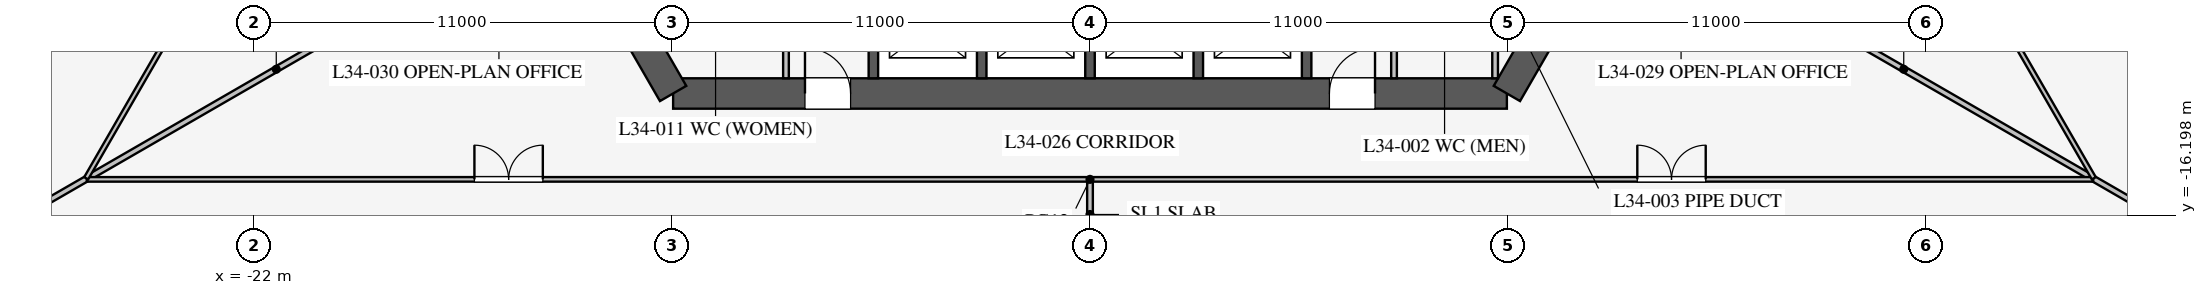
"""IFC4 building model, lengths in metres.
Left out: names, types, materials, properties, quantities, classifications, styles, units other than length and angle.
Written with IfcOpenShell. Run it as: python <this file> out.ifc"""

import sys

from ifc_helpers import new_model, si_unit, direction, frame, frame_2d, origin, place, context, subcontext, project, spatial, rectangle, extrude, element, fill, save


model = new_model("IFC4")
c1 = context("Model", 3, precision=1e-05, world=origin(), true_north=direction((0.0, 1.0)))
c2 = subcontext(c1, "Body", "Model", "MODEL_VIEW")
j1 = project(units=[si_unit("LENGTHUNIT", "METRE"), si_unit("PLANEANGLEUNIT", "RADIAN")], contexts=[c1])
p1 = place(None, origin())
s1 = spatial("IfcSite", under=j1, at=p1, CompositionType="ELEMENT")
p2 = place(p1, origin())
s2 = spatial("IfcBuilding", under=s1, at=p2, CompositionType="ELEMENT")
p3 = place(p2, frame((0.0, 0.0, 149.3)))
s3 = spatial("IfcBuildingStorey", under=s2, at=p3, CompositionType="ELEMENT", Elevation=149.3)
p4 = place(p3, frame((-10.97, -13.0, 0.0), z_axis=(0.0, 0.0, 1.0), x_axis=(1.0, 0.0, 0.0)))
e1 = element("IfcWall", 1, at=p4, inside=s3, PredefinedType="SHEAR", context=c2, shape_type="SweptSolid", body=[
    extrude(rectangle(XDim=21.939, YDim=0.8, at=frame_2d((10.97, 0.0))), origin(), (0.0, 0.0, 1.0), 4.2),
])
p5 = place(p4, frame((17.27, 0.0, 0.0)))
e2 = element("IfcOpeningElement", 2, at=p5, cuts=e1, PredefinedType="OPENING", context=c2, shape_type="SweptSolid", body=[
    extrude(rectangle(XDim=1.2, YDim=2.1, at=frame_2d((0.6, 1.05))), frame((0.0, 0.41, 0.0), z_axis=(0.0, -1.0, 0.0), x_axis=(1.0, 0.0, 0.0)), (0.0, 0.0, 1.0), 0.82),
])
p6 = place(p4, frame((3.47, 0.0, 0.0)))
e3 = element("IfcOpeningElement", 3, at=p6, cuts=e1, PredefinedType="OPENING", context=c2, shape_type="SweptSolid", body=[
    extrude(rectangle(XDim=1.2, YDim=2.1, at=frame_2d((0.6, 1.05))), frame((0.0, 0.41, 0.0), z_axis=(0.0, -1.0, 0.0), x_axis=(1.0, 0.0, 0.0)), (0.0, 0.0, 1.0), 0.82),
])
for number, where, z_axis, x_axis in (
    (4, (10.97, -13.0, 0.0), (0.0, 0.0, 1.0), (0.5, 0.866, 0.0)),
    (5, (-16.743, -3.0, 0.0), (0.0, 0.0, 1.0), (0.5, -0.866, 0.0)),
):
    element("IfcWall", number, at=place(p3, frame(where, z_axis=z_axis, x_axis=x_axis)), inside=s3, PredefinedType="SHEAR", context=c2, shape_type="SweptSolid", body=[
        extrude(rectangle(XDim=11.547, YDim=0.8, at=frame_2d((5.773, 0.0))), origin(), (0.0, 0.0, 1.0), 4.2),
    ])
for number, where, z_axis, x_axis in (
    (6, (-5.7, -10.025, 0.0), (0.0, 0.0, 1.0), (0.0, -1.0, 0.0)),
    (7, (-2.85, -10.025, 0.0), (0.0, 0.0, 1.0), (0.0, -1.0, 0.0)),
    (8, (0.0, -10.025, 0.0), (0.0, 0.0, 1.0), (0.0, -1.0, 0.0)),
    (9, (2.85, -10.025, 0.0), (0.0, 0.0, 1.0), (0.0, -1.0, 0.0)),
    (10, (5.7, -10.025, 0.0), (0.0, 0.0, 1.0), (0.0, -1.0, 0.0)),
):
    element("IfcWall", number, at=place(p3, frame(where, z_axis=z_axis, x_axis=x_axis)), inside=s3, PredefinedType="SHEAR", context=c2, shape_type="SweptSolid", body=[
        extrude(rectangle(XDim=2.575, YDim=0.25, at=frame_2d((1.288, 0.0))), origin(), (0.0, 0.0, 1.0), 4.2),
    ])
p7 = place(p3, frame((8.0, -7.5, 0.0), z_axis=(0.0, 0.0, 1.0), x_axis=(0.0, -1.0, 0.0)))
e11 = element("IfcWall", 11, at=p7, inside=s3, PredefinedType="PARTITIONING", context=c2, shape_type="SweptSolid", body=[
    extrude(rectangle(XDim=5.1, YDim=0.15, at=frame_2d((2.55, 0.0))), origin(), (0.0, 0.0, 1.0), 4.0),
])
p8 = place(p7, frame((1.3, 0.0, 0.0)))
e12 = element("IfcOpeningElement", 12, at=p8, cuts=e11, PredefinedType="OPENING", context=c2, shape_type="SweptSolid", body=[
    extrude(rectangle(XDim=0.9, YDim=2.1, at=frame_2d((0.45, 1.05))), frame((0.0, 0.085, 0.0), z_axis=(0.0, -1.0, 0.0), x_axis=(1.0, 0.0, 0.0)), (0.0, 0.0, 1.0), 0.17),
])
p9 = place(p3, frame((-8.0, -7.5, 0.0), z_axis=(0.0, 0.0, 1.0), x_axis=(0.0, -1.0, 0.0)))
e13 = element("IfcWall", 13, at=p9, inside=s3, PredefinedType="PARTITIONING", context=c2, shape_type="SweptSolid", body=[
    extrude(rectangle(XDim=5.1, YDim=0.15, at=frame_2d((2.55, 0.0))), origin(), (0.0, 0.0, 1.0), 4.0),
])
p10 = place(p9, frame((2.6, 0.0, 0.0)))
e14 = element("IfcOpeningElement", 14, at=p10, cuts=e13, PredefinedType="OPENING", context=c2, shape_type="SweptSolid", body=[
    extrude(rectangle(XDim=0.9, YDim=2.1, at=frame_2d((0.45, 1.05))), frame((0.0, 0.085, 0.0), z_axis=(0.0, -1.0, 0.0), x_axis=(1.0, 0.0, 0.0)), (0.0, 0.0, 1.0), 0.17),
])
p11 = place(p3, frame((10.66, -8.5, 0.0), z_axis=(0.0, 0.0, 1.0), x_axis=(0.0, -1.0, 0.0)))
e15 = element("IfcWall", 15, at=p11, inside=s3, PredefinedType="PARTITIONING", context=c2, shape_type="SweptSolid", body=[
    extrude(rectangle(XDim=4.1, YDim=0.15, at=frame_2d((2.05, 0.0))), origin(), (0.0, 0.0, 1.0), 4.0),
])
for number, where, z_axis, x_axis in (
    (16, (14.203, -8.2, 0.0), (0.0, 0.0, 1.0), (0.866, -0.5, 0.0)),
    (17, (-14.203, -8.2, 0.0), (0.0, 0.0, 1.0), (-0.866, -0.5, 0.0)),
):
    element("IfcWall", number, at=place(p3, frame(where, z_axis=z_axis, x_axis=x_axis)), inside=s3, PredefinedType="PARTITIONING", context=c2, shape_type="SweptSolid", body=[
        extrude(rectangle(XDim=16.65, YDim=0.15, at=frame_2d((8.325, 0.0))), origin(), (0.0, 0.0, 1.0), 2.3),
    ])
p12 = place(p3, frame((0.0, -15.32, 0.0), z_axis=(0.0, 0.0, 1.0), x_axis=(0.0, -1.0, 0.0)))
e18 = element("IfcWall", 18, at=p12, inside=s3, PredefinedType="PARTITIONING", context=c2, shape_type="SweptSolid", body=[
    extrude(rectangle(XDim=9.675, YDim=0.15, at=frame_2d((4.837, 0.0))), origin(), (0.0, 0.0, 1.0), 3.2),
])
p13 = place(p3, frame((-26.398, -15.26, 0.0), z_axis=(0.0, 0.0, 1.0), x_axis=(1.0, 0.0, 0.0)))
e19 = element("IfcWall", 19, at=p13, inside=s3, PredefinedType="PARTITIONING", context=c2, shape_type="SweptSolid", body=[
    extrude(rectangle(XDim=52.796, YDim=0.12, at=frame_2d((26.398, 0.0))), origin(), (0.0, 0.0, 1.0), 2.9),
])
p14 = place(p13, frame((10.2, 0.0, 0.15)))
e20 = element("IfcOpeningElement", 20, at=p14, cuts=e19, PredefinedType="OPENING", context=c2, shape_type="SweptSolid", body=[
    extrude(rectangle(XDim=1.8, YDim=2.1, at=frame_2d((0.9, 1.05))), frame((0.0, 0.07, 0.0), z_axis=(0.0, -1.0, 0.0), x_axis=(1.0, 0.0, 0.0)), (0.0, 0.0, 1.0), 0.14),
])
p15 = place(p13, frame((40.8, 0.0, 0.15)))
e21 = element("IfcOpeningElement", 21, at=p15, cuts=e19, PredefinedType="OPENING", context=c2, shape_type="SweptSolid", body=[
    extrude(rectangle(XDim=1.8, YDim=2.1, at=frame_2d((0.9, 1.05))), frame((0.0, 0.07, 0.0), z_axis=(0.0, -1.0, 0.0), x_axis=(1.0, 0.0, 0.0)), (0.0, 0.0, 1.0), 0.14),
])
p16 = place(p3, frame((26.415, -15.231, 0.0), z_axis=(0.0, 0.0, 1.0), x_axis=(-0.50000091641, 0.866024874695, 0.0)))
e22 = element("IfcWall", 22, at=p16, inside=s3, PredefinedType="PARTITIONING", context=c2, shape_type="SweptSolid", body=[
    extrude(rectangle(XDim=52.796, YDim=0.12, at=frame_2d((26.398, 0.0))), origin(), (0.0, 0.0, 1.0), 2.9),
])
p17 = place(p16, frame((10.2, 0.0, 0.15)))
e23 = element("IfcOpeningElement", 23, at=p17, cuts=e22, PredefinedType="OPENING", context=c2, shape_type="SweptSolid", body=[
    extrude(rectangle(XDim=1.8, YDim=2.1, at=frame_2d((0.9, 1.05))), frame((0.0, 0.07, 0.0), z_axis=(0.0, -1.0, 0.0), x_axis=(1.0, 0.0, 0.0)), (0.0, 0.0, 1.0), 0.14),
])
p18 = place(p16, frame((40.8, 0.0, 0.15)))
e24 = element("IfcOpeningElement", 24, at=p18, cuts=e22, PredefinedType="OPENING", context=c2, shape_type="SweptSolid", body=[
    extrude(rectangle(XDim=1.8, YDim=2.1, at=frame_2d((0.9, 1.05))), frame((0.0, 0.07, 0.0), z_axis=(0.0, -1.0, 0.0), x_axis=(1.0, 0.0, 0.0)), (0.0, 0.0, 1.0), 0.14),
])
p19 = place(p3, frame((-0.016, 30.491, 0.0), z_axis=(0.0, 0.0, 1.0), x_axis=(-0.50000091641, -0.866024874695, 0.0)))
e25 = element("IfcWall", 25, at=p19, inside=s3, PredefinedType="PARTITIONING", context=c2, shape_type="SweptSolid", body=[
    extrude(rectangle(XDim=52.796, YDim=0.12, at=frame_2d((26.398, 0.0))), origin(), (0.0, 0.0, 1.0), 2.9),
])
p20 = place(p19, frame((10.2, 0.0, 0.15)))
e26 = element("IfcOpeningElement", 26, at=p20, cuts=e25, PredefinedType="OPENING", context=c2, shape_type="SweptSolid", body=[
    extrude(rectangle(XDim=1.8, YDim=2.1, at=frame_2d((0.9, 1.05))), frame((0.0, 0.07, 0.0), z_axis=(0.0, -1.0, 0.0), x_axis=(1.0, 0.0, 0.0)), (0.0, 0.0, 1.0), 0.14),
])
p21 = place(p19, frame((40.8, 0.0, 0.15)))
e27 = element("IfcOpeningElement", 27, at=p21, cuts=e25, PredefinedType="OPENING", context=c2, shape_type="SweptSolid", body=[
    extrude(rectangle(XDim=1.8, YDim=2.1, at=frame_2d((0.9, 1.05))), frame((0.0, 0.07, 0.0), z_axis=(0.0, -1.0, 0.0), x_axis=(1.0, 0.0, 0.0)), (0.0, 0.0, 1.0), 0.14),
])
p22 = place(p5, origin())
e28 = element("IfcDoor", 28, at=p22, inside=s3, OperationType="SINGLE_SWING_RIGHT", PredefinedType="DOOR", context=c2, shape_type="SweptSolid", body=[
    extrude(rectangle(XDim=1.2, YDim=2.1, at=frame_2d((0.6, 1.05))), frame((0.0, 0.025, 0.0), z_axis=(0.0, -1.0, 0.0), x_axis=(1.0, 0.0, 0.0)), (0.0, 0.0, 1.0), 0.05),
])
fill(e2, e28)
p23 = place(p6, origin())
e29 = element("IfcDoor", 29, at=p23, inside=s3, OperationType="SINGLE_SWING_LEFT", PredefinedType="DOOR", context=c2, shape_type="SweptSolid", body=[
    extrude(rectangle(XDim=1.2, YDim=2.1, at=frame_2d((0.6, 1.05))), frame((0.0, 0.025, 0.0), z_axis=(0.0, -1.0, 0.0), x_axis=(1.0, 0.0, 0.0)), (0.0, 0.0, 1.0), 0.05),
])
fill(e3, e29)
p24 = place(p14, origin())
e30 = element("IfcDoor", 30, at=p24, inside=s3, OperationType="DOUBLE_DOOR_SINGLE_SWING", PredefinedType="DOOR", context=c2, shape_type="SweptSolid", body=[
    extrude(rectangle(XDim=1.8, YDim=2.1, at=frame_2d((0.9, 1.05))), frame((0.0, 0.025, 0.0), z_axis=(0.0, -1.0, 0.0), x_axis=(1.0, 0.0, 0.0)), (0.0, 0.0, 1.0), 0.05),
])
fill(e20, e30)
p25 = place(p15, origin())
e31 = element("IfcDoor", 31, at=p25, inside=s3, OperationType="DOUBLE_DOOR_SINGLE_SWING", PredefinedType="DOOR", context=c2, shape_type="SweptSolid", body=[
    extrude(rectangle(XDim=1.8, YDim=2.1, at=frame_2d((0.9, 1.05))), frame((0.0, 0.025, 0.0), z_axis=(0.0, -1.0, 0.0), x_axis=(1.0, 0.0, 0.0)), (0.0, 0.0, 1.0), 0.05),
])
fill(e21, e31)
save(model, sys.argv[1])
